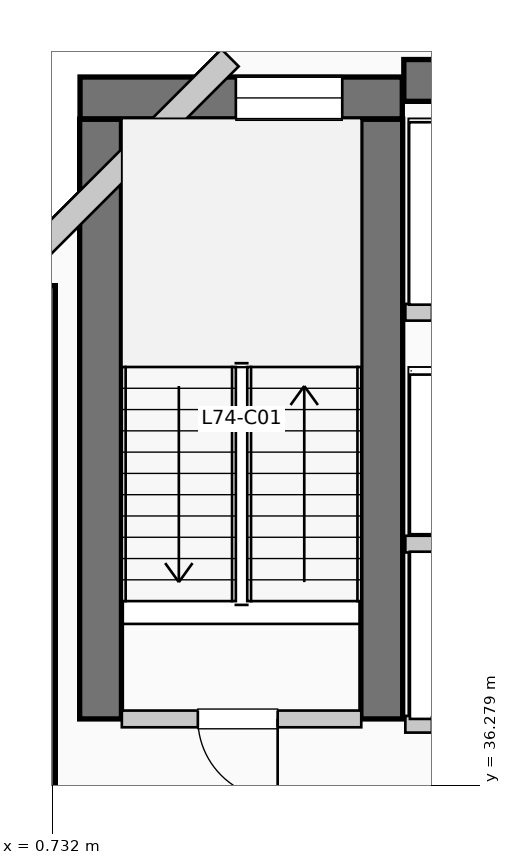
"""IFC4 building model, lengths in metres.
Left out: names, types, materials, properties, quantities, classifications, styles, units other than length and angle.
Written with IfcOpenShell. Run it as: python <this file> out.ifc"""

import sys

from ifc_helpers import new_model, si_unit, direction, frame, frame_2d, origin, place, context, subcontext, project, spatial, rectangle, extrude, element, fill, save


model = new_model("IFC4")
c1 = context("Model", 3, precision=1e-05, world=origin(), true_north=direction((0.0, 1.0)))
c2 = subcontext(c1, "Body", "Model", "MODEL_VIEW")
j1 = project(units=[si_unit("LENGTHUNIT", "METRE"), si_unit("PLANEANGLEUNIT", "RADIAN")], contexts=[c1])
p1 = place(None, origin())
s1 = spatial("IfcSite", under=j1, at=p1, CompositionType="ELEMENT")
p2 = place(p1, origin())
s2 = spatial("IfcBuilding", under=s1, at=p2, CompositionType="ELEMENT")
p3 = place(p2, frame((0.0, 0.0, 303.93)))
s3 = spatial("IfcBuildingStorey", under=s2, at=p3, CompositionType="ELEMENT", Elevation=303.93)
p4 = place(p3, frame((5.36, 45.55, 0.0), z_axis=(0.0, 0.0, 1.0), x_axis=(1.0, 0.0, 0.0)))
e1 = element("IfcWall", 1, at=p4, inside=s3, PredefinedType="SHEAR", context=c2, shape_type="SweptSolid", body=[
    extrude(rectangle(XDim=13.98, YDim=0.55, at=frame_2d((6.99, 0.0))), origin(), (0.0, 0.0, 1.0), 3.96),
])
p5 = place(p3, frame((0.5, 34.95, 0.0), z_axis=(0.0, 0.0, 1.0), x_axis=(0.0, 1.0, 0.0)))
e2 = element("IfcWall", 2, at=p5, inside=s3, PredefinedType="SHEAR", context=c2, shape_type="SweptSolid", body=[
    extrude(rectangle(XDim=7.9, YDim=0.55, at=frame_2d((3.95, 0.0))), origin(), (0.0, 0.0, 1.0), 3.96),
])
for number, where, z_axis, x_axis in (
    (3, (1.37, 37.15, 0.0), (0.0, 0.0, 1.0), (0.0, 1.0, 0.0)),
    (4, (5.07, 37.15, 0.0), (0.0, 0.0, 1.0), (0.0, 1.0, 0.0)),
):
    element("IfcWall", number, at=place(p3, frame(where, z_axis=z_axis, x_axis=x_axis)), inside=s3, PredefinedType="SHEAR", context=c2, shape_type="SweptSolid", body=[
        extrude(rectangle(XDim=7.89, YDim=0.55, at=frame_2d((3.945, 0.0))), origin(), (0.0, 0.0, 1.0), 3.96),
    ])
p6 = place(p3, frame((1.1, 45.32, 0.0), z_axis=(0.0, 0.0, 1.0), x_axis=(1.0, 0.0, 0.0)))
e5 = element("IfcWall", 5, at=p6, inside=s3, PredefinedType="SHEAR", context=c2, shape_type="SweptSolid", body=[
    extrude(rectangle(XDim=4.24, YDim=0.55, at=frame_2d((2.12, 0.0))), origin(), (0.0, 0.0, 1.0), 3.96),
])
p7 = place(p6, frame((2.05, 0.0, 1.05)))
e6 = element("IfcOpeningElement", 6, at=p7, cuts=e5, PredefinedType="OPENING", context=c2, shape_type="SweptSolid", body=[
    extrude(rectangle(XDim=1.4, YDim=1.8, at=frame_2d((0.7, 0.9))), frame((0.0, 0.285, 0.0), z_axis=(0.0, -1.0, 0.0), x_axis=(1.0, 0.0, 0.0)), (0.0, 0.0, 1.0), 0.57),
])
p8 = place(p3, frame((3.074, 45.848, 0.0), z_axis=(0.0, 0.0, 1.0), x_axis=(-0.707106781187, -0.707106781187, 0.0)))
e7 = element("IfcWall", 7, at=p8, inside=s3, PredefinedType="SOLIDWALL", context=c2, shape_type="SweptSolid", body=[
    extrude(rectangle(XDim=4.133, YDim=0.32, at=frame_2d((2.066, 0.0))), origin(), (0.0, 0.0, 1.0), 3.74),
])
p9 = place(p3, frame((1.65, 37.15, 0.0), z_axis=(0.0, 0.0, 1.0), x_axis=(1.0, 0.0, 0.0)))
e8 = element("IfcWall", 8, at=p9, inside=s3, PredefinedType="PARTITIONING", context=c2, shape_type="SweptSolid", body=[
    extrude(rectangle(XDim=3.15, YDim=0.22, at=frame_2d((1.575, 0.0))), origin(), (0.0, 0.0, 1.0), 3.74),
])
p10 = place(p9, frame((2.05, 0.0, 0.0), z_axis=(0.0, 0.0, 1.0), x_axis=(-1.0, 0.0, 0.0)))
e9 = element("IfcOpeningElement", 9, at=p10, cuts=e8, PredefinedType="OPENING", context=c2, shape_type="SweptSolid", body=[
    extrude(rectangle(XDim=1.05, YDim=2.15, at=frame_2d((0.525, 1.075))), frame((0.0, 0.12, 0.0), z_axis=(0.0, -1.0, 0.0), x_axis=(1.0, 0.0, 0.0)), (0.0, 0.0, 1.0), 0.24),
])
p11 = place(p3, frame((5.38, 37.08, 0.0), z_axis=(0.0, 0.0, 1.0), x_axis=(1.0, 0.0, 0.0)))
e10 = element("IfcWall", 10, at=p11, inside=s3, PredefinedType="PARTITIONING", context=c2, shape_type="SweptSolid", body=[
    extrude(rectangle(XDim=3.46, YDim=0.22, at=frame_2d((1.73, 0.0))), origin(), (0.0, 0.0, 1.0), 3.74),
])
p12 = place(p11, frame((1.55, 0.0, 0.0), z_axis=(0.0, 0.0, 1.0), x_axis=(-1.0, 0.0, 0.0)))
e11 = element("IfcOpeningElement", 11, at=p12, cuts=e10, PredefinedType="OPENING", context=c2, shape_type="SweptSolid", body=[
    extrude(rectangle(XDim=1.2, YDim=2.2, at=frame_2d((0.6, 1.1))), frame((0.0, 0.12, 0.0), z_axis=(0.0, -1.0, 0.0), x_axis=(1.0, 0.0, 0.0)), (0.0, 0.0, 1.0), 0.24),
])
p13 = place(p11, frame((3.22, 0.0, 0.0), z_axis=(0.0, 0.0, 1.0), x_axis=(-1.0, 0.0, 0.0)))
e12 = element("IfcOpeningElement", 12, at=p13, cuts=e10, PredefinedType="OPENING", context=c2, shape_type="SweptSolid", body=[
    extrude(rectangle(XDim=1.2, YDim=2.2, at=frame_2d((0.6, 1.1))), frame((0.0, 0.12, 0.0), z_axis=(0.0, -1.0, 0.0), x_axis=(1.0, 0.0, 0.0)), (0.0, 0.0, 1.0), 0.24),
])
p14 = place(p3, frame((5.38, 39.45, 0.0), z_axis=(0.0, 0.0, 1.0), x_axis=(1.0, 0.0, 0.0)))
e13 = element("IfcWall", 13, at=p14, inside=s3, PredefinedType="PARTITIONING", context=c2, shape_type="SweptSolid", body=[
    extrude(rectangle(XDim=3.46, YDim=0.22, at=frame_2d((1.73, 0.0))), origin(), (0.0, 0.0, 1.0), 3.74),
])
p15 = place(p3, frame((5.38, 42.5, 0.0), z_axis=(0.0, 0.0, 1.0), x_axis=(1.0, 0.0, 0.0)))
e14 = element("IfcWall", 14, at=p15, inside=s3, PredefinedType="PARTITIONING", context=c2, shape_type="SweptSolid", body=[
    extrude(rectangle(XDim=3.77, YDim=0.22, at=frame_2d((1.885, 0.0))), origin(), (0.0, 0.0, 1.0), 3.74),
])
p16 = place(p15, frame((1.75, 0.0, 0.0), z_axis=(0.0, 0.0, 1.0), x_axis=(-1.0, 0.0, 0.0)))
e15 = element("IfcOpeningElement", 15, at=p16, cuts=e14, PredefinedType="OPENING", context=c2, shape_type="SweptSolid", body=[
    extrude(rectangle(XDim=1.4, YDim=2.2, at=frame_2d((0.7, 1.1))), frame((0.0, 0.12, 0.0), z_axis=(0.0, -1.0, 0.0), x_axis=(1.0, 0.0, 0.0)), (0.0, 0.0, 1.0), 0.24),
])
p17 = place(p15, frame((3.53, 0.0, 0.0), z_axis=(0.0, 0.0, 1.0), x_axis=(-1.0, 0.0, 0.0)))
e16 = element("IfcOpeningElement", 16, at=p17, cuts=e14, PredefinedType="OPENING", context=c2, shape_type="SweptSolid", body=[
    extrude(rectangle(XDim=1.4, YDim=2.2, at=frame_2d((0.7, 1.1))), frame((0.0, 0.12, 0.0), z_axis=(0.0, -1.0, 0.0), x_axis=(1.0, 0.0, 0.0)), (0.0, 0.0, 1.0), 0.24),
])
p18 = place(p7, origin())
e17 = element("IfcWindow", 17, at=p18, inside=s3, PartitioningType="SINGLE_PANEL", PredefinedType="WINDOW", context=c2, shape_type="SweptSolid", body=[
    extrude(rectangle(XDim=1.4, YDim=1.8, at=frame_2d((0.7, 0.9))), frame((0.0, 0.03, 0.0), z_axis=(0.0, -1.0, 0.0), x_axis=(1.0, 0.0, 0.0)), (0.0, 0.0, 1.0), 0.06),
])
fill(e6, e17)
p19 = place(p10, origin())
e18 = element("IfcDoor", 18, at=p19, inside=s3, OperationType="SINGLE_SWING_RIGHT", PredefinedType="DOOR", context=c2, shape_type="SweptSolid", body=[
    extrude(rectangle(XDim=1.05, YDim=2.15, at=frame_2d((0.525, 1.075))), frame((0.0, 0.025, 0.0), z_axis=(0.0, -1.0, 0.0), x_axis=(1.0, 0.0, 0.0)), (0.0, 0.0, 1.0), 0.05),
])
fill(e9, e18)
save(model, sys.argv[1])
